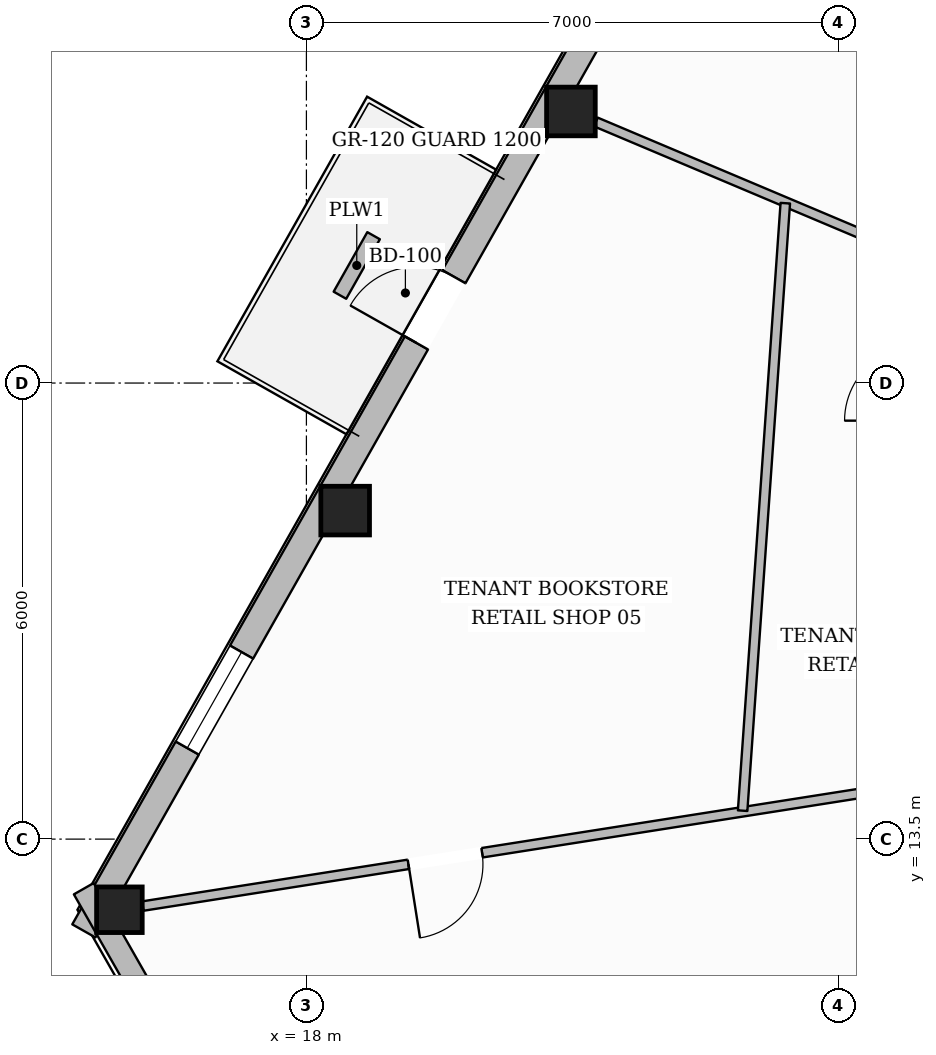
"""IFC4 building model, lengths in metres.
Left out: names, types, materials, properties, quantities, classifications, styles, units other than length and angle.
Written with IfcOpenShell. Run it as: python <this file> out.ifc"""

import sys

from ifc_helpers import new_model, si_unit, direction, frame, frame_2d, origin, origin_2d, place, context, subcontext, project, spatial, rectangle, hollow_rectangle, extrude, element, fill, save


model = new_model("IFC4")
c1 = context("Model", 3, precision=1e-05, world=origin(), true_north=direction((0.0, 1.0)))
c2 = subcontext(c1, "Body", "Model", "MODEL_VIEW")
j1 = project(units=[si_unit("LENGTHUNIT", "METRE"), si_unit("PLANEANGLEUNIT", "RADIAN")], contexts=[c1])
p1 = place(None, origin())
s1 = spatial("IfcSite", under=j1, at=p1, CompositionType="ELEMENT")
p2 = place(p1, origin())
s2 = spatial("IfcBuilding", under=s1, at=p2, CompositionType="ELEMENT")
p3 = place(p2, frame((0.0, 0.0, 168.85)))
s3 = spatial("IfcBuildingStorey", under=s2, at=p3, CompositionType="ELEMENT", Elevation=168.85)
for number, where, z_axis, x_axis in (
    (1, (21.48, 23.073, 0.0), (0.0, 0.0, 1.0), (1.0, 0.0, 0.0)),
    (2, (18.51, 17.822, 0.0), (0.0, 0.0, 1.0), (1.0, 0.0, 0.0)),
):
    element("IfcColumn", number, at=place(p3, frame(where, z_axis=z_axis, x_axis=x_axis)), inside=s3, PredefinedType="COLUMN", context=c2, shape_type="SweptSolid", body=[
        extrude(hollow_rectangle(XDim=0.64, YDim=0.64, WallThickness=0.028, at=origin_2d()), origin(), (0.0, 0.0, 1.0), 3.6),
    ])
p4 = place(p3, frame((15.54, 12.571, 0.0), z_axis=(0.0, 0.0, 1.0), x_axis=(1.0, 0.0, 0.0)))
e3 = element("IfcColumn", 3, at=p4, inside=s3, PredefinedType="COLUMN", context=c2, shape_type="SweptSolid", body=[
    extrude(hollow_rectangle(XDim=0.6, YDim=0.6, WallThickness=0.028, at=origin_2d()), origin(), (0.0, 0.0, 1.0), 3.6),
])
p5 = place(p3, frame((15.072, 12.292, 0.0), z_axis=(0.0, 0.0, 1.0), x_axis=(0.492336574501, 0.870404904288, 0.0)))
e4 = element("IfcWall", 4, at=p5, inside=s3, PredefinedType="STANDARD", context=c2, shape_type="SweptSolid", body=[
    extrude(rectangle(XDim=37.15, YDim=0.35, at=frame_2d((18.575, 0.0))), origin(), (0.0, 0.0, 1.0), 3.132),
])
p6 = place(p5, frame((8.888, 0.0, 0.0)))
e5 = element("IfcOpeningElement", 5, at=p6, cuts=e4, PredefinedType="OPENING", context=c2, shape_type="SweptSolid", body=[
    extrude(rectangle(XDim=1.0, YDim=2.2, at=frame_2d((0.5, 1.1))), frame((0.0, 0.185, 0.0), z_axis=(0.0, -1.0, 0.0), x_axis=(1.0, 0.0, 0.0)), (0.0, 0.0, 1.0), 0.37),
])
p7 = place(p5, frame((32.928, 0.0, 0.65)))
e6 = element("IfcOpeningElement", 6, at=p7, cuts=e4, PredefinedType="OPENING", context=c2, shape_type="SweptSolid", body=[
    extrude(rectangle(XDim=1.45, YDim=1.75, at=frame_2d((0.725, 0.875))), frame((0.0, 0.185, 0.0), z_axis=(0.0, -1.0, 0.0), x_axis=(1.0, 0.0, 0.0)), (0.0, 0.0, 1.0), 0.37),
])
p8 = place(p5, frame((26.895, 0.0, 0.65)))
e7 = element("IfcOpeningElement", 7, at=p8, cuts=e4, PredefinedType="OPENING", context=c2, shape_type="SweptSolid", body=[
    extrude(rectangle(XDim=1.45, YDim=1.75, at=frame_2d((0.725, 0.875))), frame((0.0, 0.185, 0.0), z_axis=(0.0, -1.0, 0.0), x_axis=(1.0, 0.0, 0.0)), (0.0, 0.0, 1.0), 0.37),
])
p9 = place(p5, frame((20.862, 0.0, 0.65)))
e8 = element("IfcOpeningElement", 8, at=p9, cuts=e4, PredefinedType="OPENING", context=c2, shape_type="SweptSolid", body=[
    extrude(rectangle(XDim=1.45, YDim=1.75, at=frame_2d((0.725, 0.875))), frame((0.0, 0.185, 0.0), z_axis=(0.0, -1.0, 0.0), x_axis=(1.0, 0.0, 0.0)), (0.0, 0.0, 1.0), 0.37),
])
p10 = place(p5, frame((2.764, 0.0, 0.65)))
e9 = element("IfcOpeningElement", 9, at=p10, cuts=e4, PredefinedType="OPENING", context=c2, shape_type="SweptSolid", body=[
    extrude(rectangle(XDim=1.45, YDim=1.75, at=frame_2d((0.725, 0.875))), frame((0.0, 0.185, 0.0), z_axis=(0.0, -1.0, 0.0), x_axis=(1.0, 0.0, 0.0)), (0.0, 0.0, 1.0), 0.37),
])
p11 = place(p3, frame((20.247, 3.77, 0.0), z_axis=(0.0, 0.0, 1.0), x_axis=(-0.495323484774, 0.868708607895, 0.0)))
e10 = element("IfcWall", 10, at=p11, inside=s3, PredefinedType="STANDARD", context=c2, shape_type="SweptSolid", body=[
    extrude(rectangle(XDim=10.449, YDim=0.3, at=frame_2d((5.225, 0.0))), origin(), (0.0, 0.0, 1.0), 3.132),
])
p12 = place(p11, frame((4.7, 0.0, 0.65)))
e11 = element("IfcOpeningElement", 11, at=p12, cuts=e10, PredefinedType="OPENING", context=c2, shape_type="SweptSolid", body=[
    extrude(rectangle(XDim=1.05, YDim=1.7, at=frame_2d((0.525, 0.85))), frame((0.0, 0.16, 0.0), z_axis=(0.0, -1.0, 0.0), x_axis=(1.0, 0.0, 0.0)), (0.0, 0.0, 1.0), 0.32),
])
p13 = place(p3, frame((18.884, 21.438, 0.0), z_axis=(0.0, 0.0, 1.0), x_axis=(-0.492423750739, -0.870355588083, 0.0)))
e12 = element("IfcWall", 12, at=p13, inside=s3, PredefinedType="USERDEFINED", context=c2, shape_type="SweptSolid", body=[
    extrude(rectangle(XDim=0.9, YDim=0.19, at=frame_2d((0.45, 0.0))), origin(), (0.0, 0.0, 1.0), 0.5),
])
p14 = place(p3, frame((25.979, 21.174, 0.0), z_axis=(0.0, 0.0, 1.0), x_axis=(-0.921289917918, 0.388876442001, 0.0)))
e13 = element("IfcWall", 13, at=p14, inside=s3, PredefinedType="PARTITIONING", context=c2, shape_type="SweptSolid", body=[
    extrude(rectangle(XDim=4.528, YDim=0.125, at=frame_2d((2.264, 0.0))), origin(), (0.0, 0.0, 1.0), 3.6),
])
p15 = place(p3, frame((27.98, 14.525, 0.0), z_axis=(0.0, 0.0, 1.0), x_axis=(-0.987880348001, -0.155217325174, 0.0)))
e14 = element("IfcWall", 14, at=p15, inside=s3, PredefinedType="PARTITIONING", context=c2, shape_type="SweptSolid", body=[
    extrude(rectangle(XDim=12.281, YDim=0.125, at=frame_2d((6.141, 0.0))), origin(), (0.0, 0.0, 1.0), 3.141),
])
p16 = place(p15, frame((7.763, 0.0, 0.0)))
e15 = element("IfcOpeningElement", 15, at=p16, cuts=e14, PredefinedType="OPENING", context=c2, shape_type="SweptSolid", body=[
    extrude(rectangle(XDim=0.98, YDim=2.15, at=frame_2d((0.49, 1.075))), frame((0.0, 0.073, 0.0), z_axis=(0.0, -1.0, 0.0), x_axis=(1.0, 0.0, 0.0)), (0.0, 0.0, 1.0), 0.145),
])
p17 = place(p3, frame((24.3, 21.866, 0.0), z_axis=(0.0, 0.0, 1.0), x_axis=(-0.070058077284, -0.997542914268, 0.0)))
e16 = element("IfcWall", 16, at=p17, inside=s3, PredefinedType="PARTITIONING", context=c2, shape_type="SweptSolid", body=[
    extrude(rectangle(XDim=8.012, YDim=0.125, at=frame_2d((4.006, 0.0))), origin(), (0.0, 0.0, 1.0), 3.339),
])
p18 = place(p6, origin())
e17 = element("IfcDoor", 17, at=p18, inside=s3, OperationType="SINGLE_SWING_LEFT", PredefinedType="DOOR", context=c2, shape_type="SweptSolid", body=[
    extrude(rectangle(XDim=1.0, YDim=2.2, at=frame_2d((0.5, 1.1))), frame((0.0, 0.025, 0.0), z_axis=(0.0, -1.0, 0.0), x_axis=(1.0, 0.0, 0.0)), (0.0, 0.0, 1.0), 0.05),
])
fill(e5, e17)
p19 = place(p10, origin())
e18 = element("IfcWindow", 18, at=p19, inside=s3, PartitioningType="SINGLE_PANEL", PredefinedType="WINDOW", context=c2, shape_type="SweptSolid", body=[
    extrude(rectangle(XDim=1.45, YDim=1.75, at=frame_2d((0.725, 0.875))), frame((0.0, 0.03, 0.0), z_axis=(0.0, -1.0, 0.0), x_axis=(1.0, 0.0, 0.0)), (0.0, 0.0, 1.0), 0.06),
])
fill(e9, e18)
p20 = place(p16, origin())
e19 = element("IfcDoor", 19, at=p20, inside=s3, OperationType="SINGLE_SWING_RIGHT", PredefinedType="DOOR", context=c2, shape_type="SweptSolid", body=[
    extrude(rectangle(XDim=0.98, YDim=2.15, at=frame_2d((0.49, 1.075))), frame((0.0, 0.025, 0.0), z_axis=(0.0, -1.0, 0.0), x_axis=(1.0, 0.0, 0.0)), (0.0, 0.0, 1.0), 0.05),
])
fill(e15, e19)
save(model, sys.argv[1])
